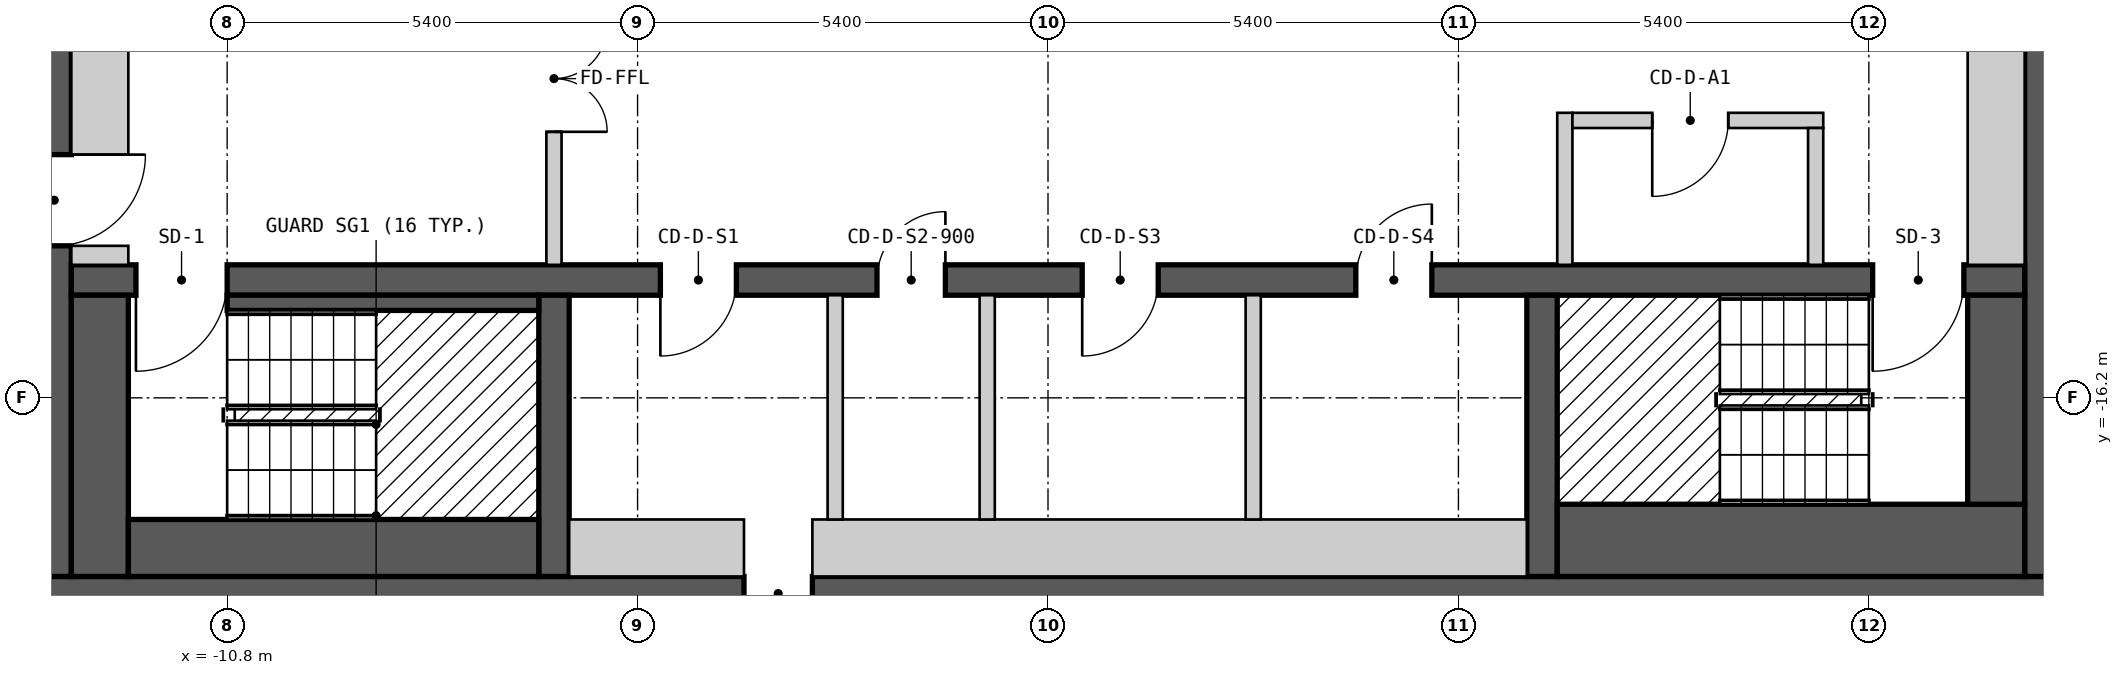
"""IFC4 building model, lengths in metres.
Left out: names, types, materials, properties, quantities, classifications, styles, units other than length and angle.
Written with IfcOpenShell. Run it as: python <this file> out.ifc"""

import sys

from ifc_helpers import new_model, si_unit, direction, frame, frame_2d, origin, place, context, subcontext, project, spatial, polyline, rectangle, outline, extrude, element, fill, save


model = new_model("IFC4")
c1 = context("Model", 3, precision=1e-05, world=origin(), true_north=direction((0.0, 1.0)))
c2 = subcontext(c1, "Body", "Model", "MODEL_VIEW")
j1 = project(units=[si_unit("LENGTHUNIT", "METRE"), si_unit("PLANEANGLEUNIT", "RADIAN")], contexts=[c1])
p1 = place(None, origin())
s1 = spatial("IfcSite", under=j1, at=p1, CompositionType="ELEMENT")
p2 = place(p1, origin())
s2 = spatial("IfcBuilding", under=s1, at=p2, CompositionType="ELEMENT")
p3 = place(p2, frame((0.0, 0.0, 223.8)))
s3 = spatial("IfcBuildingStorey", under=s2, at=p3, CompositionType="ELEMENT", Elevation=223.8)
p4 = place(p3, frame((-13.3, -18.775, 0.0), z_axis=(0.0, 0.0, 1.0), x_axis=(1.0, 0.0, 0.0)))
e1 = element("IfcWall", 1, at=p4, inside=s3, PredefinedType="SHEAR", context=c2, shape_type="SweptSolid", body=[
    extrude(rectangle(XDim=26.6, YDim=0.45, at=frame_2d((13.3, 0.0))), origin(), (0.0, 0.0, 1.0), 2.7),
])
p5 = place(p4, frame((9.3, 0.0, 0.0)))
e2 = element("IfcOpeningElement", 2, at=p5, cuts=e1, PredefinedType="OPENING", context=c2, shape_type="SweptSolid", body=[
    extrude(rectangle(XDim=0.9, YDim=2.1, at=frame_2d((0.45, 1.05))), frame((0.0, 0.235, 0.0), z_axis=(0.0, -1.0, 0.0), x_axis=(1.0, 0.0, 0.0)), (0.0, 0.0, 1.0), 0.47),
])
p6 = place(p3, frame((-13.075, -18.55, 0.0), z_axis=(0.0, 0.0, 1.0), x_axis=(0.0, 1.0, 0.0)))
e3 = element("IfcWall", 3, at=p6, inside=s3, PredefinedType="SHEAR", context=c2, shape_type="SweptSolid", body=[
    extrude(rectangle(XDim=13.1, YDim=0.45, at=frame_2d((6.55, 0.0))), origin(), (0.0, 0.0, 1.0), 2.7),
])
p7 = place(p6, frame((4.35, 0.0, 0.0)))
e4 = element("IfcOpeningElement", 4, at=p7, cuts=e3, PredefinedType="OPENING", context=c2, shape_type="SweptSolid", body=[
    extrude(rectangle(XDim=1.2, YDim=2.1, at=frame_2d((0.6, 1.05))), frame((0.0, 0.235, 0.0), z_axis=(0.0, -1.0, 0.0), x_axis=(1.0, 0.0, 0.0)), (0.0, 0.0, 1.0), 0.47),
])
p8 = place(p3, frame((13.075, -18.55, 0.0), z_axis=(0.0, 0.0, 1.0), x_axis=(0.0, 1.0, 0.0)))
e5 = element("IfcWall", 5, at=p8, inside=s3, PredefinedType="SHEAR", context=c2, shape_type="SweptSolid", body=[
    extrude(rectangle(XDim=13.1, YDim=0.45, at=frame_2d((6.55, 0.0))), origin(), (0.0, 0.0, 1.0), 2.7),
])
p9 = place(p3, frame((-12.85, -14.65, 0.0), z_axis=(0.0, 0.0, 1.0), x_axis=(1.0, 0.0, 0.0)))
e6 = element("IfcWall", 6, at=p9, inside=s3, PredefinedType="SHEAR", context=c2, shape_type="SweptSolid", body=[
    extrude(rectangle(XDim=25.7, YDim=0.4, at=frame_2d((12.85, 0.0))), origin(), (0.0, 0.0, 1.0), 2.7),
])
p10 = place(p9, frame((2.05, 0.0, 0.0), z_axis=(0.0, 0.0, 1.0), x_axis=(-1.0, 0.0, 0.0)))
e7 = element("IfcOpeningElement", 7, at=p10, cuts=e6, PredefinedType="OPENING", context=c2, shape_type="SweptSolid", body=[
    extrude(rectangle(XDim=1.2, YDim=2.1, at=frame_2d((0.6, 1.05))), frame((0.0, 0.21, 0.0), z_axis=(0.0, -1.0, 0.0), x_axis=(1.0, 0.0, 0.0)), (0.0, 0.0, 1.0), 0.42),
])
p11 = place(p9, frame((24.9, 0.0, 0.0), z_axis=(0.0, 0.0, 1.0), x_axis=(-1.0, 0.0, 0.0)))
e8 = element("IfcOpeningElement", 8, at=p11, cuts=e6, PredefinedType="OPENING", context=c2, shape_type="SweptSolid", body=[
    extrude(rectangle(XDim=1.2, YDim=2.1, at=frame_2d((0.6, 1.05))), frame((0.0, 0.21, 0.0), z_axis=(0.0, -1.0, 0.0), x_axis=(1.0, 0.0, 0.0)), (0.0, 0.0, 1.0), 0.42),
])
p12 = place(p9, frame((8.75, 0.0, 0.0), z_axis=(0.0, 0.0, 1.0), x_axis=(-1.0, 0.0, 0.0)))
e9 = element("IfcOpeningElement", 9, at=p12, cuts=e6, PredefinedType="OPENING", context=c2, shape_type="SweptSolid", body=[
    extrude(rectangle(XDim=1.0, YDim=2.1, at=frame_2d((0.5, 1.05))), frame((0.0, 0.21, 0.0), z_axis=(0.0, -1.0, 0.0), x_axis=(1.0, 0.0, 0.0)), (0.0, 0.0, 1.0), 0.42),
])
p13 = place(p9, frame((11.5, 0.0, 0.0), z_axis=(0.0, 0.0, 1.0), x_axis=(-1.0, 0.0, 0.0)))
e10 = element("IfcOpeningElement", 10, at=p13, cuts=e6, PredefinedType="OPENING", context=c2, shape_type="SweptSolid", body=[
    extrude(rectangle(XDim=0.9, YDim=2.1, at=frame_2d((0.45, 1.05))), frame((0.0, 0.21, 0.0), z_axis=(0.0, -1.0, 0.0), x_axis=(1.0, 0.0, 0.0)), (0.0, 0.0, 1.0), 0.42),
])
p14 = place(p9, frame((14.3, 0.0, 0.0), z_axis=(0.0, 0.0, 1.0), x_axis=(-1.0, 0.0, 0.0)))
e11 = element("IfcOpeningElement", 11, at=p14, cuts=e6, PredefinedType="OPENING", context=c2, shape_type="SweptSolid", body=[
    extrude(rectangle(XDim=1.0, YDim=2.1, at=frame_2d((0.5, 1.05))), frame((0.0, 0.21, 0.0), z_axis=(0.0, -1.0, 0.0), x_axis=(1.0, 0.0, 0.0)), (0.0, 0.0, 1.0), 0.42),
])
p15 = place(p9, frame((17.9, 0.0, 0.0), z_axis=(0.0, 0.0, 1.0), x_axis=(-1.0, 0.0, 0.0)))
e12 = element("IfcOpeningElement", 12, at=p15, cuts=e6, PredefinedType="OPENING", context=c2, shape_type="SweptSolid", body=[
    extrude(rectangle(XDim=1.0, YDim=2.1, at=frame_2d((0.5, 1.05))), frame((0.0, 0.21, 0.0), z_axis=(0.0, -1.0, 0.0), x_axis=(1.0, 0.0, 0.0)), (0.0, 0.0, 1.0), 0.42),
])
for number, where, z_axis, x_axis in (
    (13, (-6.5, -18.55, 0.0), (0.0, 0.0, 1.0), (0.0, 1.0, 0.0)),
    (14, (6.5, -18.55, 0.0), (0.0, 0.0, 1.0), (0.0, 1.0, 0.0)),
):
    element("IfcWall", number, at=place(p3, frame(where, z_axis=z_axis, x_axis=x_axis)), inside=s3, PredefinedType="SHEAR", context=c2, shape_type="SweptSolid", body=[
        extrude(rectangle(XDim=3.7, YDim=0.4, at=frame_2d((1.85, 0.0))), origin(), (0.0, 0.0, 1.0), 2.7),
    ])
p16 = place(p3, frame((-15.34, -18.37, 0.0), z_axis=(0.0, 0.0, 1.0), x_axis=(0.866022959057, -0.500004234368, 0.0)))
e15 = element("IfcWall", 15, at=p16, inside=s3, PredefinedType="SOLIDWALL", context=c2, shape_type="SweptSolid", body=[
    extrude(outline(polyline([(0.0, -0.15), (5.0, -0.15), (4.92, 0.15), (0.08, 0.15), (0.0, -0.15)])), origin(), (0.0, 0.0, 1.0), 2.7),
])
p17 = place(p16, frame((0.65, 0.0, 0.15)))
e16 = element("IfcOpeningElement", 16, at=p17, cuts=e15, PredefinedType="OPENING", context=c2, shape_type="SweptSolid", body=[
    extrude(rectangle(XDim=1.2, YDim=2.1, at=frame_2d((0.6, 1.05))), frame((0.0, 0.16, 0.0), z_axis=(0.0, -1.0, 0.0), x_axis=(1.0, 0.0, 0.0)), (0.0, 0.0, 1.0), 0.32),
])
p18 = place(p3, frame((11.01, -20.87, 0.0), z_axis=(0.0, 0.0, 1.0), x_axis=(0.866022959057, 0.500004234368, 0.0)))
e17 = element("IfcWall", 17, at=p18, inside=s3, PredefinedType="SOLIDWALL", context=c2, shape_type="SweptSolid", body=[
    extrude(outline(polyline([(0.0, -0.15), (5.0, -0.15), (4.92, 0.15), (0.08, 0.15), (0.0, -0.15)])), origin(), (0.0, 0.0, 1.0), 2.7),
])
p19 = place(p18, frame((0.65, 0.0, 0.15)))
e18 = element("IfcOpeningElement", 18, at=p19, cuts=e17, PredefinedType="OPENING", context=c2, shape_type="SweptSolid", body=[
    extrude(rectangle(XDim=1.2, YDim=2.1, at=frame_2d((0.6, 1.05))), frame((0.0, 0.16, 0.0), z_axis=(0.0, -1.0, 0.0), x_axis=(1.0, 0.0, 0.0)), (0.0, 0.0, 1.0), 0.32),
])
p20 = place(p3, frame((-12.475, -18.55, 0.0), z_axis=(0.0, 0.0, 1.0), x_axis=(0.0, 1.0, 0.0)))
e19 = element("IfcWall", 19, at=p20, inside=s3, PredefinedType="SOLIDWALL", context=c2, shape_type="SweptSolid", body=[
    extrude(rectangle(XDim=3.7, YDim=0.75, at=frame_2d((1.85, 0.0))), origin(), (0.0, 0.0, 1.0), 2.7),
])
p21 = place(p3, frame((-12.85, -14.325, 0.0), z_axis=(0.0, 0.0, 1.0), x_axis=(1.0, 0.0, 0.0)))
e20 = element("IfcWall", 20, at=p21, inside=s3, PredefinedType="PARTITIONING", context=c2, shape_type="SweptSolid", body=[
    extrude(rectangle(XDim=0.75, YDim=0.25, at=frame_2d((0.375, 0.0))), origin(), (0.0, 0.0, 1.0), 2.7),
])
p22 = place(p3, frame((-12.475, -13.0, 0.0), z_axis=(0.0, 0.0, 1.0), x_axis=(0.0, 1.0, 0.0)))
e21 = element("IfcWall", 21, at=p22, inside=s3, PredefinedType="PARTITIONING", context=c2, shape_type="SweptSolid", body=[
    extrude(rectangle(XDim=3.45, YDim=0.75, at=frame_2d((1.725, 0.0))), origin(), (0.0, 0.0, 1.0), 2.7),
])
p23 = place(p3, frame((-12.1, -18.175, 0.0), z_axis=(0.0, 0.0, 1.0), x_axis=(1.0, 0.0, 0.0)))
e22 = element("IfcWall", 22, at=p23, inside=s3, PredefinedType="SOLIDWALL", context=c2, shape_type="SweptSolid", body=[
    extrude(rectangle(XDim=5.4, YDim=0.75, at=frame_2d((2.7, 0.0))), origin(), (0.0, 0.0, 1.0), 2.7),
])
p24 = place(p3, frame((-10.8, -14.95, 0.0), z_axis=(0.0, 0.0, 1.0), x_axis=(1.0, 0.0, 0.0)))
e23 = element("IfcWall", 23, at=p24, inside=s3, PredefinedType="SOLIDWALL", context=c2, shape_type="SweptSolid", body=[
    extrude(rectangle(XDim=4.1, YDim=0.2, at=frame_2d((2.05, 0.0))), origin(), (0.0, 0.0, 1.0), 2.7),
])
p25 = place(p3, frame((-6.5, -14.45, 0.0), z_axis=(0.0, 0.0, 1.0), x_axis=(0.0, 1.0, 0.0)))
e24 = element("IfcWall", 24, at=p25, inside=s3, PredefinedType="PARTITIONING", context=c2, shape_type="SweptSolid", body=[
    extrude(rectangle(XDim=4.9, YDim=0.2, at=frame_2d((2.45, 0.0))), origin(), (0.0, 0.0, 1.0), 2.7),
])
p26 = place(p25, frame((3.15, 0.0, 0.0), z_axis=(0.0, 0.0, 1.0), x_axis=(-1.0, 0.0, 0.0)))
e25 = element("IfcOpeningElement", 25, at=p26, cuts=e24, PredefinedType="OPENING", context=c2, shape_type="SweptSolid", body=[
    extrude(rectangle(XDim=1.4, YDim=2.1, at=frame_2d((0.7, 1.05))), frame((0.0, 0.11, 0.0), z_axis=(0.0, -1.0, 0.0), x_axis=(1.0, 0.0, 0.0)), (0.0, 0.0, 1.0), 0.22),
])
p27 = place(p3, frame((-6.3, -18.175, 0.0), z_axis=(0.0, 0.0, 1.0), x_axis=(1.0, 0.0, 0.0)))
e26 = element("IfcWall", 26, at=p27, inside=s3, PredefinedType="PARTITIONING", context=c2, shape_type="SweptSolid", body=[
    extrude(rectangle(XDim=2.3, YDim=0.75, at=frame_2d((1.15, 0.0))), origin(), (0.0, 0.0, 1.0), 2.7),
])
p28 = place(p3, frame((-3.1, -18.175, 0.0), z_axis=(0.0, 0.0, 1.0), x_axis=(1.0, 0.0, 0.0)))
e27 = element("IfcWall", 27, at=p28, inside=s3, PredefinedType="PARTITIONING", context=c2, shape_type="SweptSolid", body=[
    extrude(rectangle(XDim=9.4, YDim=0.75, at=frame_2d((4.7, 0.0))), origin(), (0.0, 0.0, 1.0), 2.7),
])
for number, where, z_axis, x_axis in (
    (28, (-2.8, -17.8, 0.0), (0.0, 0.0, 1.0), (0.0, 1.0, 0.0)),
    (29, (-0.8, -17.8, 0.0), (0.0, 0.0, 1.0), (0.0, 1.0, 0.0)),
    (30, (2.7, -17.8, 0.0), (0.0, 0.0, 1.0), (0.0, 1.0, 0.0)),
):
    element("IfcWall", number, at=place(p3, frame(where, z_axis=z_axis, x_axis=x_axis)), inside=s3, PredefinedType="PARTITIONING", context=c2, shape_type="SweptSolid", body=[
        extrude(rectangle(XDim=2.95, YDim=0.2, at=frame_2d((1.475, 0.0))), origin(), (0.0, 0.0, 1.0), 2.7),
    ])
p29 = place(p3, frame((6.7, -18.075, 0.0), z_axis=(0.0, 0.0, 1.0), x_axis=(1.0, 0.0, 0.0)))
e31 = element("IfcWall", 31, at=p29, inside=s3, PredefinedType="SOLIDWALL", context=c2, shape_type="SweptSolid", body=[
    extrude(rectangle(XDim=6.15, YDim=0.95, at=frame_2d((3.075, 0.0))), origin(), (0.0, 0.0, 1.0), 2.7),
])
p30 = place(p3, frame((6.8, -14.45, 0.0), z_axis=(0.0, 0.0, 1.0), x_axis=(0.0, 1.0, 0.0)))
e32 = element("IfcWall", 32, at=p30, inside=s3, PredefinedType="PARTITIONING", context=c2, shape_type="SweptSolid", body=[
    extrude(rectangle(XDim=2.0, YDim=0.2, at=frame_2d((1.0, 0.0))), origin(), (0.0, 0.0, 1.0), 2.7),
])
p31 = place(p3, frame((6.9, -12.55, 0.0), z_axis=(0.0, 0.0, 1.0), x_axis=(1.0, 0.0, 0.0)))
e33 = element("IfcWall", 33, at=p31, inside=s3, PredefinedType="PARTITIONING", context=c2, shape_type="SweptSolid", body=[
    extrude(rectangle(XDim=3.3, YDim=0.2, at=frame_2d((1.65, 0.0))), origin(), (0.0, 0.0, 1.0), 2.7),
])
p32 = place(p31, frame((2.05, 0.0, 0.0), z_axis=(0.0, 0.0, 1.0), x_axis=(-1.0, 0.0, 0.0)))
e34 = element("IfcOpeningElement", 34, at=p32, cuts=e33, PredefinedType="OPENING", context=c2, shape_type="SweptSolid", body=[
    extrude(rectangle(XDim=1.0, YDim=2.1, at=frame_2d((0.5, 1.05))), frame((0.0, 0.11, 0.0), z_axis=(0.0, -1.0, 0.0), x_axis=(1.0, 0.0, 0.0)), (0.0, 0.0, 1.0), 0.22),
])
p33 = place(p3, frame((10.1, -14.45, 0.0), z_axis=(0.0, 0.0, 1.0), x_axis=(0.0, 1.0, 0.0)))
e35 = element("IfcWall", 35, at=p33, inside=s3, PredefinedType="PARTITIONING", context=c2, shape_type="SweptSolid", body=[
    extrude(rectangle(XDim=1.8, YDim=0.2, at=frame_2d((0.9, 0.0))), origin(), (0.0, 0.0, 1.0), 2.7),
])
p34 = place(p3, frame((12.475, -17.6, 0.0), z_axis=(0.0, 0.0, 1.0), x_axis=(0.0, 1.0, 0.0)))
e36 = element("IfcWall", 36, at=p34, inside=s3, PredefinedType="SOLIDWALL", context=c2, shape_type="SweptSolid", body=[
    extrude(rectangle(XDim=2.75, YDim=0.75, at=frame_2d((1.375, 0.0))), origin(), (0.0, 0.0, 1.0), 2.7),
])
p35 = place(p3, frame((12.475, -14.45, 0.0), z_axis=(0.0, 0.0, 1.0), x_axis=(0.0, 1.0, 0.0)))
e37 = element("IfcWall", 37, at=p35, inside=s3, PredefinedType="PARTITIONING", context=c2, shape_type="SweptSolid", body=[
    extrude(rectangle(XDim=8.25, YDim=0.75, at=frame_2d((4.125, 0.0))), origin(), (0.0, 0.0, 1.0), 2.7),
])
p36 = place(p10, origin())
e38 = element("IfcDoor", 38, at=p36, inside=s3, OperationType="SINGLE_SWING_RIGHT", PredefinedType="DOOR", context=c2, shape_type="SweptSolid", body=[
    extrude(rectangle(XDim=1.2, YDim=2.1, at=frame_2d((0.6, 1.05))), frame((0.0, 0.025, 0.0), z_axis=(0.0, -1.0, 0.0), x_axis=(1.0, 0.0, 0.0)), (0.0, 0.0, 1.0), 0.05),
])
fill(e7, e38)
p37 = place(p11, origin())
e39 = element("IfcDoor", 39, at=p37, inside=s3, OperationType="SINGLE_SWING_RIGHT", PredefinedType="DOOR", context=c2, shape_type="SweptSolid", body=[
    extrude(rectangle(XDim=1.2, YDim=2.1, at=frame_2d((0.6, 1.05))), frame((0.0, 0.025, 0.0), z_axis=(0.0, -1.0, 0.0), x_axis=(1.0, 0.0, 0.0)), (0.0, 0.0, 1.0), 0.05),
])
fill(e8, e39)
p38 = place(p7, origin())
e40 = element("IfcDoor", 40, at=p38, inside=s3, OperationType="SINGLE_SWING_RIGHT", PredefinedType="DOOR", context=c2, shape_type="SweptSolid", body=[
    extrude(rectangle(XDim=1.2, YDim=2.1, at=frame_2d((0.6, 1.05))), frame((0.0, 0.025, 0.0), z_axis=(0.0, -1.0, 0.0), x_axis=(1.0, 0.0, 0.0)), (0.0, 0.0, 1.0), 0.05),
])
fill(e4, e40)
p39 = place(p26, origin())
e41 = element("IfcDoor", 41, at=p39, inside=s3, OperationType="DOUBLE_DOOR_SINGLE_SWING", PredefinedType="DOOR", context=c2, shape_type="SweptSolid", body=[
    extrude(rectangle(XDim=1.4, YDim=2.1, at=frame_2d((0.7, 1.05))), frame((0.0, 0.025, 0.0), z_axis=(0.0, -1.0, 0.0), x_axis=(1.0, 0.0, 0.0)), (0.0, 0.0, 1.0), 0.05),
])
fill(e25, e41)
p40 = place(p32, origin())
e42 = element("IfcDoor", 42, at=p40, inside=s3, OperationType="SINGLE_SWING_RIGHT", PredefinedType="DOOR", context=c2, shape_type="SweptSolid", body=[
    extrude(rectangle(XDim=1.0, YDim=2.1, at=frame_2d((0.5, 1.05))), frame((0.0, 0.025, 0.0), z_axis=(0.0, -1.0, 0.0), x_axis=(1.0, 0.0, 0.0)), (0.0, 0.0, 1.0), 0.05),
])
fill(e34, e42)
p41 = place(p12, origin())
e43 = element("IfcDoor", 43, at=p41, inside=s3, OperationType="SINGLE_SWING_RIGHT", PredefinedType="DOOR", context=c2, shape_type="SweptSolid", body=[
    extrude(rectangle(XDim=1.0, YDim=2.1, at=frame_2d((0.5, 1.05))), frame((0.0, 0.025, 0.0), z_axis=(0.0, -1.0, 0.0), x_axis=(1.0, 0.0, 0.0)), (0.0, 0.0, 1.0), 0.05),
])
fill(e9, e43)
p42 = place(p13, origin())
e44 = element("IfcDoor", 44, at=p42, inside=s3, OperationType="SINGLE_SWING_LEFT", PredefinedType="DOOR", context=c2, shape_type="SweptSolid", body=[
    extrude(rectangle(XDim=0.9, YDim=2.1, at=frame_2d((0.45, 1.05))), frame((0.0, 0.025, 0.0), z_axis=(0.0, -1.0, 0.0), x_axis=(1.0, 0.0, 0.0)), (0.0, 0.0, 1.0), 0.05),
])
fill(e10, e44)
p43 = place(p14, origin())
e45 = element("IfcDoor", 45, at=p43, inside=s3, OperationType="SINGLE_SWING_RIGHT", PredefinedType="DOOR", context=c2, shape_type="SweptSolid", body=[
    extrude(rectangle(XDim=1.0, YDim=2.1, at=frame_2d((0.5, 1.05))), frame((0.0, 0.025, 0.0), z_axis=(0.0, -1.0, 0.0), x_axis=(1.0, 0.0, 0.0)), (0.0, 0.0, 1.0), 0.05),
])
fill(e11, e45)
p44 = place(p15, origin())
e46 = element("IfcDoor", 46, at=p44, inside=s3, OperationType="SINGLE_SWING_LEFT", PredefinedType="DOOR", context=c2, shape_type="SweptSolid", body=[
    extrude(rectangle(XDim=1.0, YDim=2.1, at=frame_2d((0.5, 1.05))), frame((0.0, 0.025, 0.0), z_axis=(0.0, -1.0, 0.0), x_axis=(1.0, 0.0, 0.0)), (0.0, 0.0, 1.0), 0.05),
])
fill(e12, e46)
p45 = place(p5, origin())
e47 = element("IfcDoor", 47, at=p45, inside=s3, OperationType="SINGLE_SWING_RIGHT", PredefinedType="DOOR", context=c2, shape_type="SweptSolid", body=[
    extrude(rectangle(XDim=0.9, YDim=2.1, at=frame_2d((0.45, 1.05))), frame((0.0, 0.025, 0.0), z_axis=(0.0, -1.0, 0.0), x_axis=(1.0, 0.0, 0.0)), (0.0, 0.0, 1.0), 0.05),
])
fill(e2, e47)
save(model, sys.argv[1])
